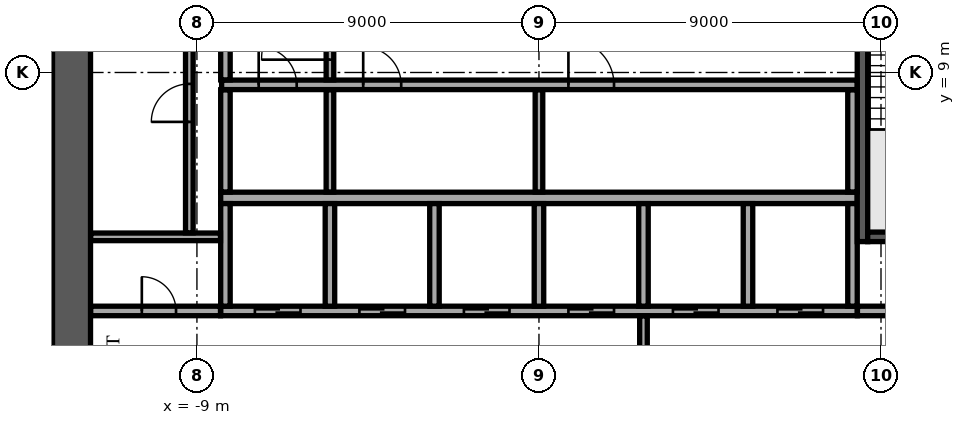
"""IFC4 building model, lengths in metres.
Left out: names, types, materials, properties, quantities, classifications, styles, units other than length and angle.
Written with IfcOpenShell. Run it as: python <this file> out.ifc"""

import sys

from ifc_helpers import new_model, si_unit, direction, frame, frame_2d, origin, place, context, subcontext, project, spatial, rectangle, extrude, element, fill, save


model = new_model("IFC4")
c1 = context("Model", 3, precision=1e-05, world=origin(), true_north=direction((0.0, 1.0)))
c2 = subcontext(c1, "Body", "Model", "MODEL_VIEW")
j1 = project(units=[si_unit("LENGTHUNIT", "METRE"), si_unit("PLANEANGLEUNIT", "RADIAN")], contexts=[c1])
p1 = place(None, origin())
s1 = spatial("IfcSite", under=j1, at=p1, CompositionType="ELEMENT")
p2 = place(p1, origin())
s2 = spatial("IfcBuilding", under=s1, at=p2, CompositionType="ELEMENT")
p3 = place(p2, frame((0.0, 0.0, 175.7)))
s3 = spatial("IfcBuildingStorey", under=s2, at=p3, CompositionType="ELEMENT", Elevation=175.7)
p4 = place(p3, frame((-12.3, -11.8, 0.0), z_axis=(0.0, 0.0, 1.0), x_axis=(0.0, 1.0, 0.0)))
e1 = element("IfcWall", 1, at=p4, inside=s3, PredefinedType="SHEAR", context=c2, shape_type="SweptSolid", body=[
    extrude(rectangle(XDim=23.6, YDim=1.0, at=frame_2d((11.8, 0.0))), origin(), (0.0, 0.0, 1.0), 3.6),
])
p5 = place(p4, frame((10.6, 0.0, 0.0)))
e2 = element("IfcOpeningElement", 2, at=p5, cuts=e1, PredefinedType="OPENING", context=c2, shape_type="SweptSolid", body=[
    extrude(rectangle(XDim=2.4, YDim=2.4, at=frame_2d((1.2, 1.2))), frame((0.0, 0.51, 0.0), z_axis=(0.0, -1.0, 0.0), x_axis=(1.0, 0.0, 0.0)), (0.0, 0.0, 1.0), 1.02),
])
p6 = place(p3, frame((-8.375, 5.7, 0.0), z_axis=(0.0, 0.0, 1.0), x_axis=(1.0, 0.0, 0.0)))
e3 = element("IfcWall", 3, at=p6, inside=s3, PredefinedType="SOLIDWALL", context=c2, shape_type="SweptSolid", body=[
    extrude(rectangle(XDim=16.75, YDim=0.3, at=frame_2d((8.375, 0.0))), origin(), (0.0, 0.0, 1.0), 3.6),
])
p7 = place(p3, frame((-8.375, 2.725, 0.0), z_axis=(0.0, 0.0, 1.0), x_axis=(1.0, 0.0, 0.0)))
e4 = element("IfcWall", 4, at=p7, inside=s3, PredefinedType="SOLIDWALL", context=c2, shape_type="SweptSolid", body=[
    extrude(rectangle(XDim=16.75, YDim=0.25, at=frame_2d((8.375, 0.0))), origin(), (0.0, 0.0, 1.0), 3.6),
])
p8 = place(p7, frame((0.9, 0.0, 0.0)))
e5 = element("IfcOpeningElement", 5, at=p8, cuts=e4, PredefinedType="OPENING", context=c2, shape_type="SweptSolid", body=[
    extrude(rectangle(XDim=1.2, YDim=2.1, at=frame_2d((0.6, 1.05))), frame((0.0, 0.135, 0.0), z_axis=(0.0, -1.0, 0.0), x_axis=(1.0, 0.0, 0.0)), (0.0, 0.0, 1.0), 0.27),
])
p9 = place(p7, frame((3.65, 0.0, 0.0)))
e6 = element("IfcOpeningElement", 6, at=p9, cuts=e4, PredefinedType="OPENING", context=c2, shape_type="SweptSolid", body=[
    extrude(rectangle(XDim=1.2, YDim=2.1, at=frame_2d((0.6, 1.05))), frame((0.0, 0.135, 0.0), z_axis=(0.0, -1.0, 0.0), x_axis=(1.0, 0.0, 0.0)), (0.0, 0.0, 1.0), 0.27),
])
p10 = place(p7, frame((6.4, 0.0, 0.0)))
e7 = element("IfcOpeningElement", 7, at=p10, cuts=e4, PredefinedType="OPENING", context=c2, shape_type="SweptSolid", body=[
    extrude(rectangle(XDim=1.2, YDim=2.1, at=frame_2d((0.6, 1.05))), frame((0.0, 0.135, 0.0), z_axis=(0.0, -1.0, 0.0), x_axis=(1.0, 0.0, 0.0)), (0.0, 0.0, 1.0), 0.27),
])
p11 = place(p7, frame((9.15, 0.0, 0.0)))
e8 = element("IfcOpeningElement", 8, at=p11, cuts=e4, PredefinedType="OPENING", context=c2, shape_type="SweptSolid", body=[
    extrude(rectangle(XDim=1.2, YDim=2.1, at=frame_2d((0.6, 1.05))), frame((0.0, 0.135, 0.0), z_axis=(0.0, -1.0, 0.0), x_axis=(1.0, 0.0, 0.0)), (0.0, 0.0, 1.0), 0.27),
])
p12 = place(p7, frame((11.9, 0.0, 0.0)))
e9 = element("IfcOpeningElement", 9, at=p12, cuts=e4, PredefinedType="OPENING", context=c2, shape_type="SweptSolid", body=[
    extrude(rectangle(XDim=1.2, YDim=2.1, at=frame_2d((0.6, 1.05))), frame((0.0, 0.135, 0.0), z_axis=(0.0, -1.0, 0.0), x_axis=(1.0, 0.0, 0.0)), (0.0, 0.0, 1.0), 0.27),
])
p13 = place(p7, frame((14.65, 0.0, 0.0)))
e10 = element("IfcOpeningElement", 10, at=p13, cuts=e4, PredefinedType="OPENING", context=c2, shape_type="SweptSolid", body=[
    extrude(rectangle(XDim=1.2, YDim=2.1, at=frame_2d((0.6, 1.05))), frame((0.0, 0.135, 0.0), z_axis=(0.0, -1.0, 0.0), x_axis=(1.0, 0.0, 0.0)), (0.0, 0.0, 1.0), 0.27),
])
for number, where, z_axis, x_axis in (
    (11, (-8.25, 2.85, 0.0), (0.0, 0.0, 1.0), (0.0, 1.0, 0.0)),
    (12, (-5.5, 2.85, 0.0), (0.0, 0.0, 1.0), (0.0, 1.0, 0.0)),
    (13, (-2.75, 2.85, 0.0), (0.0, 0.0, 1.0), (0.0, 1.0, 0.0)),
    (14, (0.0, 2.85, 0.0), (0.0, 0.0, 1.0), (0.0, 1.0, 0.0)),
    (15, (2.75, 2.85, 0.0), (0.0, 0.0, 1.0), (0.0, 1.0, 0.0)),
    (16, (5.5, 2.85, 0.0), (0.0, 0.0, 1.0), (0.0, 1.0, 0.0)),
    (17, (8.25, 2.85, 0.0), (0.0, 0.0, 1.0), (0.0, 1.0, 0.0)),
):
    element("IfcWall", number, at=place(p3, frame(where, z_axis=z_axis, x_axis=x_axis)), inside=s3, PredefinedType="SOLIDWALL", context=c2, shape_type="SweptSolid", body=[
        extrude(rectangle(XDim=2.7, YDim=0.25, at=frame_2d((1.35, 0.0))), origin(), (0.0, 0.0, 1.0), 3.6),
    ])
p14 = place(p3, frame((8.512, 4.55, 0.0), z_axis=(0.0, 0.0, 1.0), x_axis=(0.0, 1.0, 0.0)))
e18 = element("IfcWall", 18, at=p14, inside=s3, PredefinedType="SOLIDWALL", context=c2, shape_type="SweptSolid", body=[
    extrude(rectangle(XDim=7.25, YDim=0.275, at=frame_2d((3.625, 0.0))), origin(), (0.0, 0.0, 1.0), 3.6),
])
p15 = place(p14, frame((6.0, 0.0, 0.0)))
e19 = element("IfcOpeningElement", 19, at=p15, cuts=e18, PredefinedType="OPENING", context=c2, shape_type="SweptSolid", body=[
    extrude(rectangle(XDim=1.0, YDim=2.1, at=frame_2d((0.5, 1.05))), frame((0.0, 0.147, 0.0), z_axis=(0.0, -1.0, 0.0), x_axis=(1.0, 0.0, 0.0)), (0.0, 0.0, 1.0), 0.295),
])
p16 = place(p3, frame((8.65, 4.675, 0.0), z_axis=(0.0, 0.0, 1.0), x_axis=(1.0, 0.0, 0.0)))
e20 = element("IfcWall", 20, at=p16, inside=s3, PredefinedType="SOLIDWALL", context=c2, shape_type="SweptSolid", body=[
    extrude(rectangle(XDim=3.15, YDim=0.25, at=frame_2d((1.575, 0.0))), origin(), (0.0, 0.0, 1.0), 3.6),
])
p17 = place(p3, frame((2.75, -2.595, 0.0), z_axis=(0.0, 0.0, 1.0), x_axis=(0.0, 1.0, 0.0)))
e21 = element("IfcWall", 21, at=p17, inside=s3, PredefinedType="PARTITIONING", context=c2, shape_type="SweptSolid", body=[
    extrude(rectangle(XDim=5.19, YDim=0.2, at=frame_2d((2.595, 0.0))), origin(), (0.0, 0.0, 1.0), 3.6),
])
p18 = place(p17, frame((1.395, 0.0, 0.0)))
e22 = element("IfcOpeningElement", 22, at=p18, cuts=e21, PredefinedType="OPENING", context=c2, shape_type="SweptSolid", body=[
    extrude(rectangle(XDim=2.4, YDim=2.4, at=frame_2d((1.2, 1.2))), frame((0.0, 0.11, 0.0), z_axis=(0.0, -1.0, 0.0), x_axis=(1.0, 0.0, 0.0)), (0.0, 0.0, 1.0), 0.22),
])
p19 = place(p3, frame((-11.795, 2.725, 0.0), z_axis=(0.0, 0.0, 1.0), x_axis=(1.0, 0.0, 0.0)))
e23 = element("IfcWall", 23, at=p19, inside=s3, PredefinedType="PARTITIONING", context=c2, shape_type="SweptSolid", body=[
    extrude(rectangle(XDim=3.415, YDim=0.25, at=frame_2d((1.708, 0.0))), origin(), (0.0, 0.0, 1.0), 3.6),
])
p20 = place(p19, frame((1.345, 0.0, 0.0)))
e24 = element("IfcOpeningElement", 24, at=p20, cuts=e23, PredefinedType="OPENING", context=c2, shape_type="SweptSolid", body=[
    extrude(rectangle(XDim=0.9, YDim=2.1, at=frame_2d((0.45, 1.05))), frame((0.0, 0.135, 0.0), z_axis=(0.0, -1.0, 0.0), x_axis=(1.0, 0.0, 0.0)), (0.0, 0.0, 1.0), 0.27),
])
p21 = place(p3, frame((8.38, 2.725, 0.0), z_axis=(0.0, 0.0, 1.0), x_axis=(1.0, 0.0, 0.0)))
e25 = element("IfcWall", 25, at=p21, inside=s3, PredefinedType="PARTITIONING", context=c2, shape_type="SweptSolid", body=[
    extrude(rectangle(XDim=3.415, YDim=0.25, at=frame_2d((1.708, 0.0))), origin(), (0.0, 0.0, 1.0), 3.6),
])
p22 = place(p21, frame((1.17, 0.0, 0.0)))
e26 = element("IfcOpeningElement", 26, at=p22, cuts=e25, PredefinedType="OPENING", context=c2, shape_type="SweptSolid", body=[
    extrude(rectangle(XDim=0.9, YDim=2.1, at=frame_2d((0.45, 1.05))), frame((0.0, 0.135, 0.0), z_axis=(0.0, -1.0, 0.0), x_axis=(1.0, 0.0, 0.0)), (0.0, 0.0, 1.0), 0.27),
])
p23 = place(p3, frame((-11.795, 4.675, 0.0), z_axis=(0.0, 0.0, 1.0), x_axis=(1.0, 0.0, 0.0)))
e27 = element("IfcWall", 27, at=p23, inside=s3, PredefinedType="PARTITIONING", context=c2, shape_type="SweptSolid", body=[
    extrude(rectangle(XDim=3.415, YDim=0.2, at=frame_2d((1.708, 0.0))), origin(), (0.0, 0.0, 1.0), 3.6),
])
p24 = place(p3, frame((-9.2, 4.78, 0.0), z_axis=(0.0, 0.0, 1.0), x_axis=(0.0, 1.0, 0.0)))
e28 = element("IfcWall", 28, at=p24, inside=s3, PredefinedType="PARTITIONING", context=c2, shape_type="SweptSolid", body=[
    extrude(rectangle(XDim=7.015, YDim=0.2, at=frame_2d((3.507, 0.0))), origin(), (0.0, 0.0, 1.0), 3.6),
])
p25 = place(p24, frame((2.92, 0.0, 0.0)))
e29 = element("IfcOpeningElement", 29, at=p25, cuts=e28, PredefinedType="OPENING", context=c2, shape_type="SweptSolid", body=[
    extrude(rectangle(XDim=1.0, YDim=2.1, at=frame_2d((0.5, 1.05))), frame((0.0, 0.11, 0.0), z_axis=(0.0, -1.0, 0.0), x_axis=(1.0, 0.0, 0.0)), (0.0, 0.0, 1.0), 0.22),
])
p26 = place(p3, frame((-8.25, 5.855, 0.0), z_axis=(0.0, 0.0, 1.0), x_axis=(0.0, 1.0, 0.0)))
e30 = element("IfcWall", 30, at=p26, inside=s3, PredefinedType="PARTITIONING", context=c2, shape_type="SweptSolid", body=[
    extrude(rectangle(XDim=2.69, YDim=0.25, at=frame_2d((1.345, 0.0))), origin(), (0.0, 0.0, 1.0), 3.6),
])
for number, where, z_axis, x_axis in (
    (31, (-5.5, 5.855, 0.0), (0.0, 0.0, 1.0), (0.0, 1.0, 0.0)),
    (32, (0.0, 5.855, 0.0), (0.0, 0.0, 1.0), (0.0, 1.0, 0.0)),
):
    element("IfcWall", number, at=place(p3, frame(where, z_axis=z_axis, x_axis=x_axis)), inside=s3, PredefinedType="PARTITIONING", context=c2, shape_type="SweptSolid", body=[
        extrude(rectangle(XDim=2.69, YDim=0.2, at=frame_2d((1.345, 0.0))), origin(), (0.0, 0.0, 1.0), 3.6),
    ])
p27 = place(p3, frame((8.25, 5.855, 0.0), z_axis=(0.0, 0.0, 1.0), x_axis=(0.0, 1.0, 0.0)))
e33 = element("IfcWall", 33, at=p27, inside=s3, PredefinedType="PARTITIONING", context=c2, shape_type="SweptSolid", body=[
    extrude(rectangle(XDim=2.69, YDim=0.25, at=frame_2d((1.345, 0.0))), origin(), (0.0, 0.0, 1.0), 3.6),
])
p28 = place(p3, frame((-8.35, 8.675, 0.0), z_axis=(0.0, 0.0, 1.0), x_axis=(1.0, 0.0, 0.0)))
e34 = element("IfcWall", 34, at=p28, inside=s3, PredefinedType="PARTITIONING", context=c2, shape_type="SweptSolid", body=[
    extrude(rectangle(XDim=16.72, YDim=0.25, at=frame_2d((8.36, 0.0))), origin(), (0.0, 0.0, 1.0), 3.6),
])
p29 = place(p28, frame((0.975, 0.0, 0.0)))
e35 = element("IfcOpeningElement", 35, at=p29, cuts=e34, PredefinedType="OPENING", context=c2, shape_type="SweptSolid", body=[
    extrude(rectangle(XDim=1.0, YDim=2.1, at=frame_2d((0.5, 1.05))), frame((0.0, 0.135, 0.0), z_axis=(0.0, -1.0, 0.0), x_axis=(1.0, 0.0, 0.0)), (0.0, 0.0, 1.0), 0.27),
])
p30 = place(p28, frame((3.725, 0.0, 0.0)))
e36 = element("IfcOpeningElement", 36, at=p30, cuts=e34, PredefinedType="OPENING", context=c2, shape_type="SweptSolid", body=[
    extrude(rectangle(XDim=1.0, YDim=2.1, at=frame_2d((0.5, 1.05))), frame((0.0, 0.135, 0.0), z_axis=(0.0, -1.0, 0.0), x_axis=(1.0, 0.0, 0.0)), (0.0, 0.0, 1.0), 0.27),
])
p31 = place(p28, frame((9.125, 0.0, 0.0)))
e37 = element("IfcOpeningElement", 37, at=p31, cuts=e34, PredefinedType="OPENING", context=c2, shape_type="SweptSolid", body=[
    extrude(rectangle(XDim=1.2, YDim=2.1, at=frame_2d((0.6, 1.05))), frame((0.0, 0.135, 0.0), z_axis=(0.0, -1.0, 0.0), x_axis=(1.0, 0.0, 0.0)), (0.0, 0.0, 1.0), 0.27),
])
p32 = place(p3, frame((-8.25, 8.805, 0.0), z_axis=(0.0, 0.0, 1.0), x_axis=(0.0, 1.0, 0.0)))
e38 = element("IfcWall", 38, at=p32, inside=s3, PredefinedType="PARTITIONING", context=c2, shape_type="SweptSolid", body=[
    extrude(rectangle(XDim=2.99, YDim=0.25, at=frame_2d((1.495, 0.0))), origin(), (0.0, 0.0, 1.0), 3.6),
])
p33 = place(p32, frame((0.895, 0.0, 0.0)))
e39 = element("IfcOpeningElement", 39, at=p33, cuts=e38, PredefinedType="OPENING", context=c2, shape_type="SweptSolid", body=[
    extrude(rectangle(XDim=1.0, YDim=2.1, at=frame_2d((0.5, 1.05))), frame((0.0, 0.135, 0.0), z_axis=(0.0, -1.0, 0.0), x_axis=(1.0, 0.0, 0.0)), (0.0, 0.0, 1.0), 0.27),
])
p34 = place(p3, frame((-5.5, 8.805, 0.0), z_axis=(0.0, 0.0, 1.0), x_axis=(0.0, 1.0, 0.0)))
e40 = element("IfcWall", 40, at=p34, inside=s3, PredefinedType="PARTITIONING", context=c2, shape_type="SweptSolid", body=[
    extrude(rectangle(XDim=2.99, YDim=0.2, at=frame_2d((1.495, 0.0))), origin(), (0.0, 0.0, 1.0), 3.6),
])
p35 = place(p34, frame((0.532, 0.0, 0.0)))
e41 = element("IfcOpeningElement", 41, at=p35, cuts=e40, PredefinedType="OPENING", context=c2, shape_type="SweptSolid", body=[
    extrude(rectangle(XDim=1.8, YDim=2.1, at=frame_2d((0.9, 1.05))), frame((0.0, 0.11, 0.0), z_axis=(0.0, -1.0, 0.0), x_axis=(1.0, 0.0, 0.0)), (0.0, 0.0, 1.0), 0.22),
])
p36 = place(p3, frame((3.238, 35.651, 0.0), z_axis=(0.0, 0.0, 1.0), x_axis=(-0.788009530914, -0.615663040298, 0.0)))
e42 = element("IfcWall", 42, at=p36, inside=s3, PredefinedType="STANDARD", context=c2, shape_type="SweptSolid", body=[
    extrude(rectangle(XDim=49.376, YDim=0.6, at=frame_2d((24.688, 0.0))), origin(), (0.0, 0.0, 1.0), 3.6),
])
p37 = place(p36, frame((1.2, 0.0, 0.9)))
e43 = element("IfcOpeningElement", 43, at=p37, cuts=e42, PredefinedType="OPENING", context=c2, shape_type="SweptSolid", body=[
    extrude(rectangle(XDim=2.1, YDim=2.1, at=frame_2d((1.05, 1.05))), frame((0.0, 0.31, 0.0), z_axis=(0.0, -1.0, 0.0), x_axis=(1.0, 0.0, 0.0)), (0.0, 0.0, 1.0), 0.62),
])
p38 = place(p36, frame((5.7, 0.0, 0.9)))
e44 = element("IfcOpeningElement", 44, at=p38, cuts=e42, PredefinedType="OPENING", context=c2, shape_type="SweptSolid", body=[
    extrude(rectangle(XDim=2.1, YDim=2.1, at=frame_2d((1.05, 1.05))), frame((0.0, 0.31, 0.0), z_axis=(0.0, -1.0, 0.0), x_axis=(1.0, 0.0, 0.0)), (0.0, 0.0, 1.0), 0.62),
])
p39 = place(p36, frame((10.2, 0.0, 0.9)))
e45 = element("IfcOpeningElement", 45, at=p39, cuts=e42, PredefinedType="OPENING", context=c2, shape_type="SweptSolid", body=[
    extrude(rectangle(XDim=2.1, YDim=2.1, at=frame_2d((1.05, 1.05))), frame((0.0, 0.31, 0.0), z_axis=(0.0, -1.0, 0.0), x_axis=(1.0, 0.0, 0.0)), (0.0, 0.0, 1.0), 0.62),
])
p40 = place(p36, frame((14.7, 0.0, 0.9)))
e46 = element("IfcOpeningElement", 46, at=p40, cuts=e42, PredefinedType="OPENING", context=c2, shape_type="SweptSolid", body=[
    extrude(rectangle(XDim=2.1, YDim=2.1, at=frame_2d((1.05, 1.05))), frame((0.0, 0.31, 0.0), z_axis=(0.0, -1.0, 0.0), x_axis=(1.0, 0.0, 0.0)), (0.0, 0.0, 1.0), 0.62),
])
p41 = place(p36, frame((19.2, 0.0, 0.9)))
e47 = element("IfcOpeningElement", 47, at=p41, cuts=e42, PredefinedType="OPENING", context=c2, shape_type="SweptSolid", body=[
    extrude(rectangle(XDim=2.1, YDim=2.1, at=frame_2d((1.05, 1.05))), frame((0.0, 0.31, 0.0), z_axis=(0.0, -1.0, 0.0), x_axis=(1.0, 0.0, 0.0)), (0.0, 0.0, 1.0), 0.62),
])
p42 = place(p36, frame((23.7, 0.0, 0.9)))
e48 = element("IfcOpeningElement", 48, at=p42, cuts=e42, PredefinedType="OPENING", context=c2, shape_type="SweptSolid", body=[
    extrude(rectangle(XDim=2.1, YDim=2.1, at=frame_2d((1.05, 1.05))), frame((0.0, 0.31, 0.0), z_axis=(0.0, -1.0, 0.0), x_axis=(1.0, 0.0, 0.0)), (0.0, 0.0, 1.0), 0.62),
])
p43 = place(p36, frame((28.2, 0.0, 0.9)))
e49 = element("IfcOpeningElement", 49, at=p43, cuts=e42, PredefinedType="OPENING", context=c2, shape_type="SweptSolid", body=[
    extrude(rectangle(XDim=2.1, YDim=2.1, at=frame_2d((1.05, 1.05))), frame((0.0, 0.31, 0.0), z_axis=(0.0, -1.0, 0.0), x_axis=(1.0, 0.0, 0.0)), (0.0, 0.0, 1.0), 0.62),
])
p44 = place(p36, frame((32.7, 0.0, 0.9)))
e50 = element("IfcOpeningElement", 50, at=p44, cuts=e42, PredefinedType="OPENING", context=c2, shape_type="SweptSolid", body=[
    extrude(rectangle(XDim=2.1, YDim=2.1, at=frame_2d((1.05, 1.05))), frame((0.0, 0.31, 0.0), z_axis=(0.0, -1.0, 0.0), x_axis=(1.0, 0.0, 0.0)), (0.0, 0.0, 1.0), 0.62),
])
p45 = place(p36, frame((37.2, 0.0, 0.9)))
e51 = element("IfcOpeningElement", 51, at=p45, cuts=e42, PredefinedType="OPENING", context=c2, shape_type="SweptSolid", body=[
    extrude(rectangle(XDim=2.1, YDim=2.1, at=frame_2d((1.05, 1.05))), frame((0.0, 0.31, 0.0), z_axis=(0.0, -1.0, 0.0), x_axis=(1.0, 0.0, 0.0)), (0.0, 0.0, 1.0), 0.62),
])
p46 = place(p36, frame((41.7, 0.0, 0.9)))
e52 = element("IfcOpeningElement", 52, at=p46, cuts=e42, PredefinedType="OPENING", context=c2, shape_type="SweptSolid", body=[
    extrude(rectangle(XDim=2.1, YDim=2.1, at=frame_2d((1.05, 1.05))), frame((0.0, 0.31, 0.0), z_axis=(0.0, -1.0, 0.0), x_axis=(1.0, 0.0, 0.0)), (0.0, 0.0, 1.0), 0.62),
])
p47 = place(p36, frame((46.138, 0.0, 0.9)))
e53 = element("IfcOpeningElement", 53, at=p47, cuts=e42, PredefinedType="OPENING", context=c2, shape_type="SweptSolid", body=[
    extrude(rectangle(XDim=2.1, YDim=2.1, at=frame_2d((1.05, 1.05))), frame((0.0, 0.31, 0.0), z_axis=(0.0, -1.0, 0.0), x_axis=(1.0, 0.0, 0.0)), (0.0, 0.0, 1.0), 0.62),
])
p48 = place(p3, frame((-24.433, 5.734, 0.0), z_axis=(0.0, 0.0, 1.0), x_axis=(0.788010131951, 0.615662271008, 0.0)))
e54 = element("IfcWall", 54, at=p48, inside=s3, PredefinedType="PARTITIONING", context=c2, shape_type="SweptSolid", body=[
    extrude(rectangle(XDim=31.448, YDim=0.15, at=frame_2d((15.724, 0.0))), origin(), (0.0, 0.0, 1.0), 3.15),
])
p49 = place(p48, frame((13.108, 0.0, 0.0)))
e55 = element("IfcOpeningElement", 55, at=p49, cuts=e54, PredefinedType="OPENING", context=c2, shape_type="SweptSolid", body=[
    extrude(rectangle(XDim=1.0, YDim=2.1, at=frame_2d((0.5, 1.05))), frame((0.0, 0.085, 0.0), z_axis=(0.0, -1.0, 0.0), x_axis=(1.0, 0.0, 0.0)), (0.0, 0.0, 1.0), 0.17),
])
p50 = place(p48, frame((23.227, 0.0, 0.0)))
e56 = element("IfcOpeningElement", 56, at=p50, cuts=e54, PredefinedType="OPENING", context=c2, shape_type="SweptSolid", body=[
    extrude(rectangle(XDim=1.0, YDim=2.1, at=frame_2d((0.5, 1.05))), frame((0.0, 0.085, 0.0), z_axis=(0.0, -1.0, 0.0), x_axis=(1.0, 0.0, 0.0)), (0.0, 0.0, 1.0), 0.17),
])
p51 = place(p8, origin())
e57 = element("IfcDoor", 57, at=p51, inside=s3, OperationType="DOUBLE_DOOR_SLIDING", PredefinedType="DOOR", context=c2, shape_type="SweptSolid", body=[
    extrude(rectangle(XDim=1.2, YDim=2.1, at=frame_2d((0.6, 1.05))), frame((0.0, 0.025, 0.0), z_axis=(0.0, -1.0, 0.0), x_axis=(1.0, 0.0, 0.0)), (0.0, 0.0, 1.0), 0.05),
])
fill(e5, e57)
p52 = place(p9, origin())
e58 = element("IfcDoor", 58, at=p52, inside=s3, OperationType="DOUBLE_DOOR_SLIDING", PredefinedType="DOOR", context=c2, shape_type="SweptSolid", body=[
    extrude(rectangle(XDim=1.2, YDim=2.1, at=frame_2d((0.6, 1.05))), frame((0.0, 0.025, 0.0), z_axis=(0.0, -1.0, 0.0), x_axis=(1.0, 0.0, 0.0)), (0.0, 0.0, 1.0), 0.05),
])
fill(e6, e58)
p53 = place(p10, origin())
e59 = element("IfcDoor", 59, at=p53, inside=s3, OperationType="DOUBLE_DOOR_SLIDING", PredefinedType="DOOR", context=c2, shape_type="SweptSolid", body=[
    extrude(rectangle(XDim=1.2, YDim=2.1, at=frame_2d((0.6, 1.05))), frame((0.0, 0.025, 0.0), z_axis=(0.0, -1.0, 0.0), x_axis=(1.0, 0.0, 0.0)), (0.0, 0.0, 1.0), 0.05),
])
fill(e7, e59)
p54 = place(p11, origin())
e60 = element("IfcDoor", 60, at=p54, inside=s3, OperationType="DOUBLE_DOOR_SLIDING", PredefinedType="DOOR", context=c2, shape_type="SweptSolid", body=[
    extrude(rectangle(XDim=1.2, YDim=2.1, at=frame_2d((0.6, 1.05))), frame((0.0, 0.025, 0.0), z_axis=(0.0, -1.0, 0.0), x_axis=(1.0, 0.0, 0.0)), (0.0, 0.0, 1.0), 0.05),
])
fill(e8, e60)
p55 = place(p12, origin())
e61 = element("IfcDoor", 61, at=p55, inside=s3, OperationType="DOUBLE_DOOR_SLIDING", PredefinedType="DOOR", context=c2, shape_type="SweptSolid", body=[
    extrude(rectangle(XDim=1.2, YDim=2.1, at=frame_2d((0.6, 1.05))), frame((0.0, 0.025, 0.0), z_axis=(0.0, -1.0, 0.0), x_axis=(1.0, 0.0, 0.0)), (0.0, 0.0, 1.0), 0.05),
])
fill(e9, e61)
p56 = place(p13, origin())
e62 = element("IfcDoor", 62, at=p56, inside=s3, OperationType="DOUBLE_DOOR_SLIDING", PredefinedType="DOOR", context=c2, shape_type="SweptSolid", body=[
    extrude(rectangle(XDim=1.2, YDim=2.1, at=frame_2d((0.6, 1.05))), frame((0.0, 0.025, 0.0), z_axis=(0.0, -1.0, 0.0), x_axis=(1.0, 0.0, 0.0)), (0.0, 0.0, 1.0), 0.05),
])
fill(e10, e62)
p57 = place(p20, origin())
e63 = element("IfcDoor", 63, at=p57, inside=s3, OperationType="SINGLE_SWING_RIGHT", PredefinedType="DOOR", context=c2, shape_type="SweptSolid", body=[
    extrude(rectangle(XDim=0.9, YDim=2.1, at=frame_2d((0.45, 1.05))), frame((0.0, 0.025, 0.0), z_axis=(0.0, -1.0, 0.0), x_axis=(1.0, 0.0, 0.0)), (0.0, 0.0, 1.0), 0.05),
])
fill(e24, e63)
p58 = place(p25, origin())
e64 = element("IfcDoor", 64, at=p58, inside=s3, OperationType="SINGLE_SWING_RIGHT", PredefinedType="DOOR", context=c2, shape_type="SweptSolid", body=[
    extrude(rectangle(XDim=1.0, YDim=2.1, at=frame_2d((0.5, 1.05))), frame((0.0, 0.025, 0.0), z_axis=(0.0, -1.0, 0.0), x_axis=(1.0, 0.0, 0.0)), (0.0, 0.0, 1.0), 0.05),
])
fill(e29, e64)
p59 = place(p29, origin())
e65 = element("IfcDoor", 65, at=p59, inside=s3, OperationType="SINGLE_SWING_RIGHT", PredefinedType="DOOR", context=c2, shape_type="SweptSolid", body=[
    extrude(rectangle(XDim=1.0, YDim=2.1, at=frame_2d((0.5, 1.05))), frame((0.0, 0.025, 0.0), z_axis=(0.0, -1.0, 0.0), x_axis=(1.0, 0.0, 0.0)), (0.0, 0.0, 1.0), 0.05),
])
fill(e35, e65)
p60 = place(p30, origin())
e66 = element("IfcDoor", 66, at=p60, inside=s3, OperationType="SINGLE_SWING_RIGHT", PredefinedType="DOOR", context=c2, shape_type="SweptSolid", body=[
    extrude(rectangle(XDim=1.0, YDim=2.1, at=frame_2d((0.5, 1.05))), frame((0.0, 0.025, 0.0), z_axis=(0.0, -1.0, 0.0), x_axis=(1.0, 0.0, 0.0)), (0.0, 0.0, 1.0), 0.05),
])
fill(e36, e66)
p61 = place(p31, origin())
e67 = element("IfcDoor", 67, at=p61, inside=s3, OperationType="SINGLE_SWING_LEFT", PredefinedType="DOOR", context=c2, shape_type="SweptSolid", body=[
    extrude(rectangle(XDim=1.2, YDim=2.1, at=frame_2d((0.6, 1.05))), frame((0.0, 0.025, 0.0), z_axis=(0.0, -1.0, 0.0), x_axis=(1.0, 0.0, 0.0)), (0.0, 0.0, 1.0), 0.05),
])
fill(e37, e67)
p62 = place(p35, origin())
e68 = element("IfcDoor", 68, at=p62, inside=s3, OperationType="SINGLE_SWING_LEFT", PredefinedType="DOOR", context=c2, shape_type="SweptSolid", body=[
    extrude(rectangle(XDim=1.8, YDim=2.1, at=frame_2d((0.9, 1.05))), frame((0.0, 0.025, 0.0), z_axis=(0.0, -1.0, 0.0), x_axis=(1.0, 0.0, 0.0)), (0.0, 0.0, 1.0), 0.05),
])
fill(e41, e68)
save(model, sys.argv[1])
